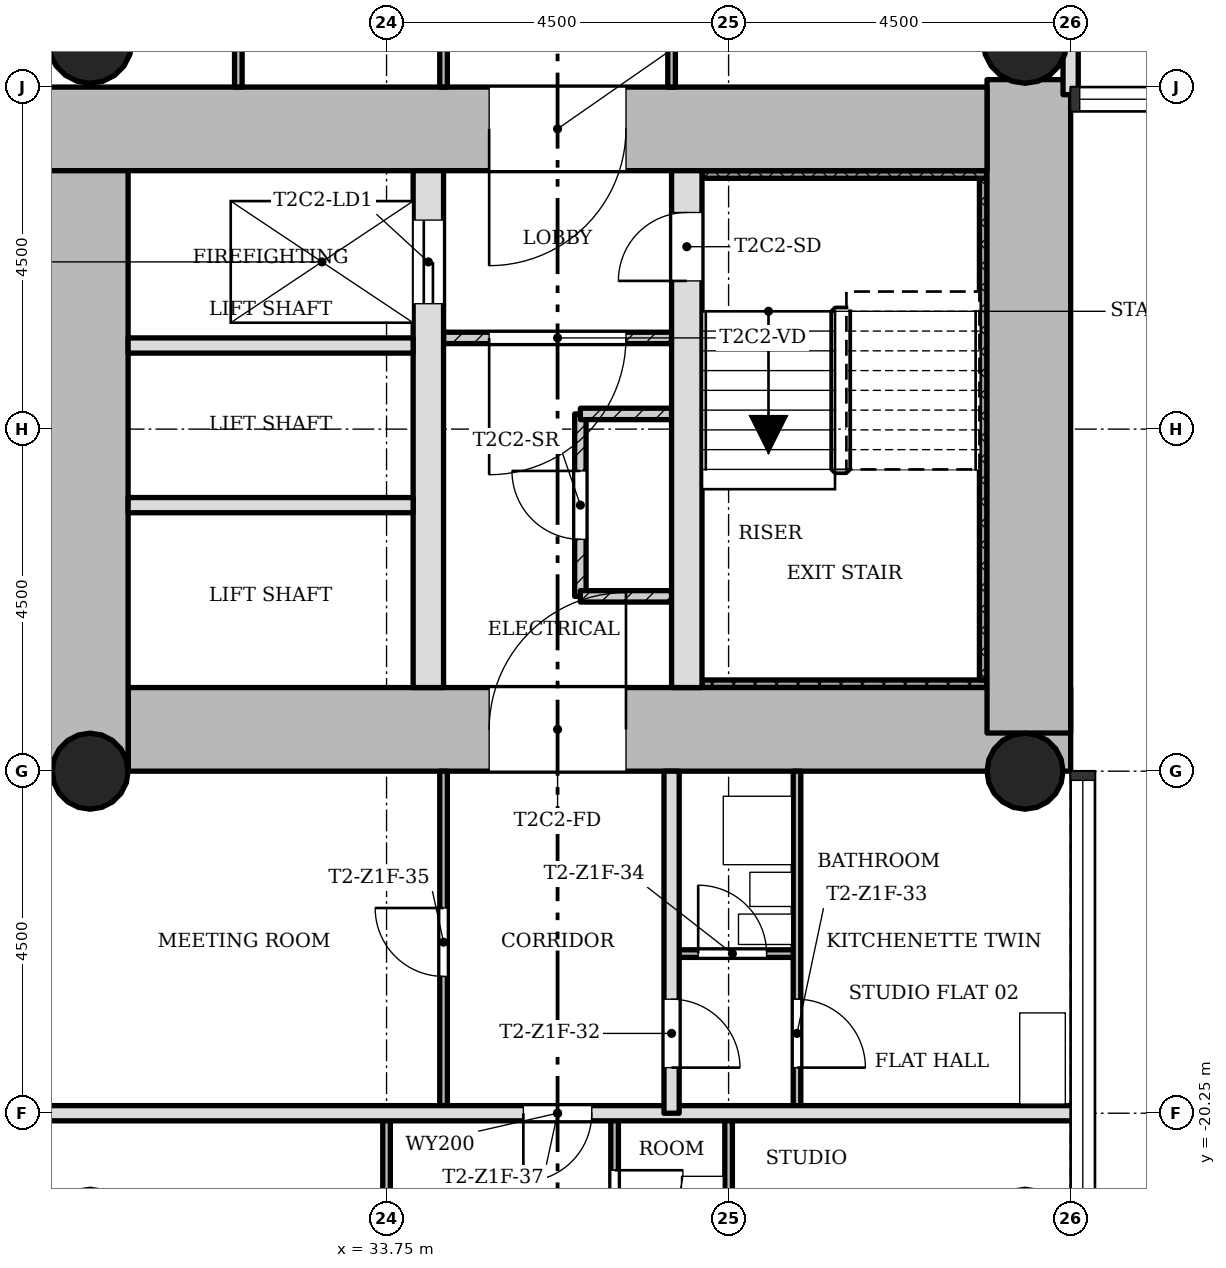
"""IFC4 building model, lengths in metres.
Left out: names, types, materials, properties, quantities, classifications, styles, units other than length and angle.
Written with IfcOpenShell. Run it as: python <this file> out.ifc"""

import sys

from ifc_helpers import new_model, si_unit, direction, frame, frame_2d, origin, origin_2d, place, context, subcontext, project, spatial, rectangle, hollow_circle, extrude, element, fill, save


model = new_model("IFC4")
c1 = context("Model", 3, precision=1e-05, world=origin(), true_north=direction((0.0, 1.0)))
c2 = subcontext(c1, "Body", "Model", "MODEL_VIEW")
j1 = project(units=[si_unit("LENGTHUNIT", "METRE"), si_unit("PLANEANGLEUNIT", "RADIAN")], contexts=[c1])
p1 = place(None, origin())
s1 = spatial("IfcSite", under=j1, at=p1, CompositionType="ELEMENT")
p2 = place(p1, origin())
s2 = spatial("IfcBuilding", under=s1, at=p2, CompositionType="ELEMENT")
p3 = place(p2, frame((0.0, 0.0, 68.7)))
s3 = spatial("IfcBuildingStorey", under=s2, at=p3, CompositionType="ELEMENT", Elevation=68.7)
p4 = place(p3, frame((30.35, -15.2, 0.0), z_axis=(0.0, 0.0, 1.0), x_axis=(1.0, 0.0, 0.0)))
e1 = element("IfcWall", 1, at=p4, inside=s3, PredefinedType="SHEAR", context=c2, shape_type="SweptSolid", body=[
    extrude(rectangle(XDim=12.4, YDim=1.1, at=frame_2d((6.2, 0.0))), origin(), (0.0, 0.0, 1.0), 3.4),
])
p5 = place(p4, frame((4.75, 0.0, 0.0)))
e2 = element("IfcOpeningElement", 2, at=p5, cuts=e1, PredefinedType="OPENING", context=c2, shape_type="SweptSolid", body=[
    extrude(rectangle(XDim=1.8, YDim=2.1, at=frame_2d((0.9, 1.05))), frame((0.0, 0.56, 0.0), z_axis=(0.0, -1.0, 0.0), x_axis=(1.0, 0.0, 0.0)), (0.0, 0.0, 1.0), 1.12),
])
p6 = place(p3, frame((42.2, -15.248, 0.0), z_axis=(0.0, 0.0, 1.0), x_axis=(0.0, 1.0, 0.0)))
e3 = element("IfcWall", 3, at=p6, inside=s3, PredefinedType="SHEAR", context=c2, shape_type="SweptSolid", body=[
    extrude(rectangle(XDim=8.596, YDim=1.1, at=frame_2d((4.298, 0.0))), origin(), (0.0, 0.0, 1.0), 3.4),
])
p7 = place(p3, frame((41.65, -7.3, 0.0), z_axis=(0.0, 0.0, 1.0), x_axis=(-1.0, 0.0, 0.0)))
e4 = element("IfcWall", 4, at=p7, inside=s3, PredefinedType="SHEAR", context=c2, shape_type="SweptSolid", body=[
    extrude(rectangle(XDim=12.4, YDim=1.1, at=frame_2d((6.2, 0.0))), origin(), (0.0, 0.0, 1.0), 3.4),
])
p8 = place(p7, frame((4.75, 0.0, 0.0)))
e5 = element("IfcOpeningElement", 5, at=p8, cuts=e4, PredefinedType="OPENING", context=c2, shape_type="SweptSolid", body=[
    extrude(rectangle(XDim=1.8, YDim=2.1, at=frame_2d((0.9, 1.05))), frame((0.0, 0.56, 0.0), z_axis=(0.0, -1.0, 0.0), x_axis=(1.0, 0.0, 0.0)), (0.0, 0.0, 1.0), 1.12),
])
p9 = place(p3, frame((29.8, -7.85, 0.0), z_axis=(0.0, 0.0, 1.0), x_axis=(0.0, -1.0, 0.0)))
e6 = element("IfcWall", 6, at=p9, inside=s3, PredefinedType="SHEAR", context=c2, shape_type="SweptSolid", body=[
    extrude(rectangle(XDim=7.9, YDim=1.1, at=frame_2d((3.95, 0.0))), origin(), (0.0, 0.0, 1.0), 3.4),
])
p10 = place(p3, frame((34.3, -14.65, 0.0), z_axis=(0.0, 0.0, 1.0), x_axis=(0.0, 1.0, 0.0)))
e7 = element("IfcWall", 7, at=p10, inside=s3, PredefinedType="SHEAR", context=c2, shape_type="SweptSolid", body=[
    extrude(rectangle(XDim=6.8, YDim=0.4, at=frame_2d((3.4, 0.0))), origin(), (0.0, 0.0, 1.0), 3.4),
])
p11 = place(p10, frame((5.05, 0.0, 0.0)))
e8 = element("IfcOpeningElement", 8, at=p11, cuts=e7, PredefinedType="OPENING", context=c2, shape_type="SweptSolid", body=[
    extrude(rectangle(XDim=1.1, YDim=2.1, at=frame_2d((0.55, 1.05))), frame((0.0, 0.21, 0.0), z_axis=(0.0, -1.0, 0.0), x_axis=(1.0, 0.0, 0.0)), (0.0, 0.0, 1.0), 0.42),
])
p12 = place(p3, frame((37.7, -14.65, 0.0), z_axis=(0.0, 0.0, 1.0), x_axis=(0.0, 1.0, 0.0)))
e9 = element("IfcWall", 9, at=p12, inside=s3, PredefinedType="SHEAR", context=c2, shape_type="SweptSolid", body=[
    extrude(rectangle(XDim=6.8, YDim=0.4, at=frame_2d((3.4, 0.0))), origin(), (0.0, 0.0, 1.0), 3.4),
])
p13 = place(p12, frame((5.35, 0.0, 0.0)))
e10 = element("IfcOpeningElement", 10, at=p13, cuts=e9, PredefinedType="OPENING", context=c2, shape_type="SweptSolid", body=[
    extrude(rectangle(XDim=0.9, YDim=2.1, at=frame_2d((0.45, 1.05))), frame((0.0, 0.21, 0.0), z_axis=(0.0, -1.0, 0.0), x_axis=(1.0, 0.0, 0.0)), (0.0, 0.0, 1.0), 0.42),
])
for number, where, z_axis, x_axis in (
    (11, (42.15, -15.75, 0.0), (0.0, 0.0, 1.0), (1.0, 0.0, 0.0)),
    (12, (29.85, -15.75, 0.0), (0.0, 0.0, 1.0), (1.0, 0.0, 0.0)),
):
    element("IfcColumn", number, at=place(p3, frame(where, z_axis=z_axis, x_axis=x_axis)), inside=s3, PredefinedType="COLUMN", context=c2, shape_type="SweptSolid", body=[
        extrude(hollow_circle(Radius=0.5, WallThickness=0.036, at=origin_2d()), origin(), (0.0, 0.0, 1.0), 3.4),
    ])
for number, where, z_axis, x_axis in (
    (13, (42.15, -6.15, 0.0), (0.0, 0.0, 1.0), (1.0, 0.0, 0.0)),
    (14, (29.85, -6.15, 0.0), (0.0, 0.0, 1.0), (1.0, 0.0, 0.0)),
):
    element("IfcColumn", number, at=place(p3, frame(where, z_axis=z_axis, x_axis=x_axis)), inside=s3, PredefinedType="COLUMN", context=c2, shape_type="SweptSolid", body=[
        extrude(hollow_circle(Radius=0.55, WallThickness=0.04, at=origin_2d()), origin(), (0.0, 0.0, 1.0), 3.4),
    ])
p14 = place(p3, frame((34.5, -10.05, 0.0), z_axis=(0.0, 0.0, 1.0), x_axis=(1.0, 0.0, 0.0)))
e15 = element("IfcWall", 15, at=p14, inside=s3, PredefinedType="PARTITIONING", context=c2, shape_type="SweptSolid", body=[
    extrude(rectangle(XDim=3.0, YDim=0.15, at=frame_2d((1.5, 0.0))), origin(), (0.0, 0.0, 1.0), 3.0),
])
p15 = place(p14, frame((0.6, 0.0, 0.0)))
e16 = element("IfcOpeningElement", 16, at=p15, cuts=e15, PredefinedType="OPENING", context=c2, shape_type="SweptSolid", body=[
    extrude(rectangle(XDim=1.8, YDim=2.1, at=frame_2d((0.9, 1.05))), frame((0.0, 0.085, 0.0), z_axis=(0.0, -1.0, 0.0), x_axis=(1.0, 0.0, 0.0)), (0.0, 0.0, 1.0), 0.17),
])
for number, where, z_axis, x_axis in (
    (17, (30.35, -10.15, 0.0), (0.0, 0.0, 1.0), (1.0, 0.0, 0.0)),
    (18, (30.35, -12.25, 0.0), (0.0, 0.0, 1.0), (1.0, 0.0, 0.0)),
):
    element("IfcWall", number, at=place(p3, frame(where, z_axis=z_axis, x_axis=x_axis)), inside=s3, PredefinedType="SOLIDWALL", context=c2, shape_type="SweptSolid", body=[
        extrude(rectangle(XDim=3.75, YDim=0.2, at=frame_2d((1.875, 0.0))), origin(), (0.0, 0.0, 1.0), 3.0),
    ])
p16 = place(p3, frame((36.3, -11.05, 0.0), z_axis=(0.0, 0.0, 1.0), x_axis=(0.0, -1.0, 0.0)))
e19 = element("IfcWall", 19, at=p16, inside=s3, PredefinedType="PARTITIONING", context=c2, shape_type="SweptSolid", body=[
    extrude(rectangle(XDim=2.4, YDim=0.15, at=frame_2d((1.2, 0.0))), origin(), (0.0, 0.0, 1.0), 3.0),
])
p17 = place(p16, frame((0.75, 0.0, 0.0)))
e20 = element("IfcOpeningElement", 20, at=p17, cuts=e19, PredefinedType="OPENING", context=c2, shape_type="SweptSolid", body=[
    extrude(rectangle(XDim=0.9, YDim=2.1, at=frame_2d((0.45, 1.05))), frame((0.0, 0.085, 0.0), z_axis=(0.0, -1.0, 0.0), x_axis=(1.0, 0.0, 0.0)), (0.0, 0.0, 1.0), 0.17),
])
for number, where, z_axis, x_axis in (
    (21, (36.3, -11.05, 0.0), (0.0, 0.0, 1.0), (1.0, 0.0, 0.0)),
    (22, (36.3, -13.45, 0.0), (0.0, 0.0, 1.0), (1.0, 0.0, 0.0)),
):
    element("IfcWall", number, at=place(p3, frame(where, z_axis=z_axis, x_axis=x_axis)), inside=s3, PredefinedType="PARTITIONING", context=c2, shape_type="SweptSolid", body=[
        extrude(rectangle(XDim=1.2, YDim=0.15, at=frame_2d((0.6, 0.0))), origin(), (0.0, 0.0, 1.0), 3.0),
    ])
p18 = place(p3, frame((42.85, -20.25, 0.0), z_axis=(0.0, 0.0, 1.0), x_axis=(-1.0, 0.0, 0.0)))
e23 = element("IfcWall", 23, at=p18, inside=s3, PredefinedType="SOLIDWALL", context=c2, shape_type="SweptSolid", body=[
    extrude(rectangle(XDim=13.7, YDim=0.2, at=frame_2d((6.85, 0.0))), origin(), (0.0, 0.0, 1.0), 3.0),
])
p19 = place(p18, frame((6.4, 0.0, 0.0)))
e24 = element("IfcOpeningElement", 24, at=p19, cuts=e23, PredefinedType="OPENING", context=c2, shape_type="SweptSolid", body=[
    extrude(rectangle(XDim=0.9, YDim=2.1, at=frame_2d((0.45, 1.05))), frame((0.0, 0.11, 0.0), z_axis=(0.0, -1.0, 0.0), x_axis=(1.0, 0.0, 0.0)), (0.0, 0.0, 1.0), 0.22),
])
p20 = place(p3, frame((39.15, -18.15, 0.0), z_axis=(0.0, 0.0, 1.0), x_axis=(-1.0, 0.0, 0.0)))
e25 = element("IfcWall", 25, at=p20, inside=s3, PredefinedType="PARTITIONING", context=c2, shape_type="SweptSolid", body=[
    extrude(rectangle(XDim=1.65, YDim=0.1, at=frame_2d((0.825, 0.0))), origin(), (0.0, 0.0, 1.0), 3.0),
])
p21 = place(p20, frame((0.4, 0.0, 0.0)))
e26 = element("IfcOpeningElement", 26, at=p21, cuts=e25, PredefinedType="OPENING", context=c2, shape_type="SweptSolid", body=[
    extrude(rectangle(XDim=0.9, YDim=2.1, at=frame_2d((0.45, 1.05))), frame((0.0, 0.06, 0.0), z_axis=(0.0, -1.0, 0.0), x_axis=(1.0, 0.0, 0.0)), (0.0, 0.0, 1.0), 0.12),
])
p22 = place(p3, frame((42.75, -6.85, 0.0), z_axis=(0.0, 0.0, 1.0), x_axis=(0.0, 1.0, 0.0)))
e27 = element("IfcWall", 27, at=p22, inside=s3, PredefinedType="SOLIDWALL", context=c2, shape_type="SweptSolid", body=[
    extrude(rectangle(XDim=13.7, YDim=0.2, at=frame_2d((6.85, 0.0))), origin(), (0.0, 0.0, 1.0), 3.0),
])
p23 = place(p22, frame((6.4, 0.0, 0.0)))
e28 = element("IfcOpeningElement", 28, at=p23, cuts=e27, PredefinedType="OPENING", context=c2, shape_type="SweptSolid", body=[
    extrude(rectangle(XDim=0.9, YDim=2.1, at=frame_2d((0.45, 1.05))), frame((0.0, 0.11, 0.0), z_axis=(0.0, -1.0, 0.0), x_axis=(1.0, 0.0, 0.0)), (0.0, 0.0, 1.0), 0.22),
])
p24 = place(p3, frame((39.15, -20.25, 0.0), z_axis=(0.0, 0.0, 1.0), x_axis=(0.0, 1.0, 0.0)))
e29 = element("IfcWall", 29, at=p24, inside=s3, PredefinedType="PARTITIONING", context=c2, shape_type="SweptSolid", body=[
    extrude(rectangle(XDim=4.5, YDim=0.1, at=frame_2d((2.25, 0.0))), origin(), (0.0, 0.0, 1.0), 3.0),
])
p25 = place(p24, frame((0.6, 0.0, 0.0)))
e30 = element("IfcOpeningElement", 30, at=p25, cuts=e29, PredefinedType="OPENING", context=c2, shape_type="SweptSolid", body=[
    extrude(rectangle(XDim=0.9, YDim=2.1, at=frame_2d((0.45, 1.05))), frame((0.0, 0.06, 0.0), z_axis=(0.0, -1.0, 0.0), x_axis=(1.0, 0.0, 0.0)), (0.0, 0.0, 1.0), 0.12),
])
p26 = place(p3, frame((38.25, -24.85, 0.0), z_axis=(0.0, 0.0, 1.0), x_axis=(0.0, 1.0, 0.0)))
e31 = element("IfcWall", 31, at=p26, inside=s3, PredefinedType="PARTITIONING", context=c2, shape_type="SweptSolid", body=[
    extrude(rectangle(XDim=4.6, YDim=0.1, at=frame_2d((2.3, 0.0))), origin(), (0.0, 0.0, 1.0), 3.0),
])
p27 = place(p26, frame((1.25, 0.0, 0.0)))
e32 = element("IfcOpeningElement", 32, at=p27, cuts=e31, PredefinedType="OPENING", context=c2, shape_type="SweptSolid", body=[
    extrude(rectangle(XDim=0.9, YDim=2.1, at=frame_2d((0.45, 1.05))), frame((0.0, 0.06, 0.0), z_axis=(0.0, -1.0, 0.0), x_axis=(1.0, 0.0, 0.0)), (0.0, 0.0, 1.0), 0.12),
])
p28 = place(p3, frame((37.5, -6.75, 0.0), z_axis=(0.0, 0.0, 1.0), x_axis=(0.0, 1.0, 0.0)))
e33 = element("IfcWall", 33, at=p28, inside=s3, PredefinedType="PARTITIONING", context=c2, shape_type="SweptSolid", body=[
    extrude(rectangle(XDim=5.85, YDim=0.1, at=frame_2d((2.925, 0.0))), origin(), (0.0, 0.0, 1.0), 3.0),
])
p29 = place(p28, frame((1.575, 0.0, 0.0)))
e34 = element("IfcOpeningElement", 34, at=p29, cuts=e33, PredefinedType="OPENING", context=c2, shape_type="SweptSolid", body=[
    extrude(rectangle(XDim=0.9, YDim=2.1, at=frame_2d((0.45, 1.05))), frame((0.0, 0.06, 0.0), z_axis=(0.0, -1.0, 0.0), x_axis=(1.0, 0.0, 0.0)), (0.0, 0.0, 1.0), 0.12),
])
p30 = place(p3, frame((37.5, -20.25, 0.0), z_axis=(0.0, 0.0, 1.0), x_axis=(0.0, 1.0, 0.0)))
e35 = element("IfcWall", 35, at=p30, inside=s3, PredefinedType="SOLIDWALL", context=c2, shape_type="SweptSolid", body=[
    extrude(rectangle(XDim=4.5, YDim=0.2, at=frame_2d((2.25, 0.0))), origin(), (0.0, 0.0, 1.0), 3.0),
])
p31 = place(p30, frame((0.6, 0.0, 0.0)))
e36 = element("IfcOpeningElement", 36, at=p31, cuts=e35, PredefinedType="OPENING", context=c2, shape_type="SweptSolid", body=[
    extrude(rectangle(XDim=0.9, YDim=2.1, at=frame_2d((0.45, 1.05))), frame((0.0, 0.11, 0.0), z_axis=(0.0, -1.0, 0.0), x_axis=(1.0, 0.0, 0.0)), (0.0, 0.0, 1.0), 0.22),
])
p32 = place(p3, frame((36.75, -22.65, 0.0), z_axis=(0.0, 0.0, 1.0), x_axis=(0.0, 1.0, 0.0)))
e37 = element("IfcWall", 37, at=p32, inside=s3, PredefinedType="PARTITIONING", context=c2, shape_type="SweptSolid", body=[
    extrude(rectangle(XDim=2.4, YDim=0.1, at=frame_2d((1.2, 0.0))), origin(), (0.0, 0.0, 1.0), 3.0),
])
p33 = place(p32, frame((0.75, 0.0, 0.0)))
e38 = element("IfcOpeningElement", 38, at=p33, cuts=e37, PredefinedType="OPENING", context=c2, shape_type="SweptSolid", body=[
    extrude(rectangle(XDim=0.9, YDim=2.1, at=frame_2d((0.45, 1.05))), frame((0.0, 0.06, 0.0), z_axis=(0.0, -1.0, 0.0), x_axis=(1.0, 0.0, 0.0)), (0.0, 0.0, 1.0), 0.12),
])
p34 = place(p3, frame((34.5, -20.25, 0.0), z_axis=(0.0, 0.0, 1.0), x_axis=(0.0, 1.0, 0.0)))
e39 = element("IfcWall", 39, at=p34, inside=s3, PredefinedType="PARTITIONING", context=c2, shape_type="SweptSolid", body=[
    extrude(rectangle(XDim=4.5, YDim=0.1, at=frame_2d((2.25, 0.0))), origin(), (0.0, 0.0, 1.0), 3.0),
])
p35 = place(p34, frame((1.8, 0.0, 0.0)))
e40 = element("IfcOpeningElement", 40, at=p35, cuts=e39, PredefinedType="OPENING", context=c2, shape_type="SweptSolid", body=[
    extrude(rectangle(XDim=0.9, YDim=2.1, at=frame_2d((0.45, 1.05))), frame((0.0, 0.06, 0.0), z_axis=(0.0, -1.0, 0.0), x_axis=(1.0, 0.0, 0.0)), (0.0, 0.0, 1.0), 0.12),
])
p36 = place(p3, frame((34.5, -6.75, 0.0), z_axis=(0.0, 0.0, 1.0), x_axis=(0.0, 1.0, 0.0)))
e41 = element("IfcWall", 41, at=p36, inside=s3, PredefinedType="PARTITIONING", context=c2, shape_type="SweptSolid", body=[
    extrude(rectangle(XDim=5.85, YDim=0.1, at=frame_2d((2.925, 0.0))), origin(), (0.0, 0.0, 1.0), 3.0),
])
p37 = place(p36, frame((2.475, 0.0, 0.0)))
e42 = element("IfcOpeningElement", 42, at=p37, cuts=e41, PredefinedType="OPENING", context=c2, shape_type="SweptSolid", body=[
    extrude(rectangle(XDim=0.9, YDim=2.1, at=frame_2d((0.45, 1.05))), frame((0.0, 0.06, 0.0), z_axis=(0.0, -1.0, 0.0), x_axis=(1.0, 0.0, 0.0)), (0.0, 0.0, 1.0), 0.12),
])
p38 = place(p3, frame((33.75, -24.85, 0.0), z_axis=(0.0, 0.0, 1.0), x_axis=(0.0, 1.0, 0.0)))
e43 = element("IfcWall", 43, at=p38, inside=s3, PredefinedType="PARTITIONING", context=c2, shape_type="SweptSolid", body=[
    extrude(rectangle(XDim=4.6, YDim=0.1, at=frame_2d((2.3, 0.0))), origin(), (0.0, 0.0, 1.0), 3.0),
])
p39 = place(p38, frame((1.9, 0.0, 0.0)))
e44 = element("IfcOpeningElement", 44, at=p39, cuts=e43, PredefinedType="OPENING", context=c2, shape_type="SweptSolid", body=[
    extrude(rectangle(XDim=0.9, YDim=2.1, at=frame_2d((0.45, 1.05))), frame((0.0, 0.06, 0.0), z_axis=(0.0, -1.0, 0.0), x_axis=(1.0, 0.0, 0.0)), (0.0, 0.0, 1.0), 0.12),
])
p40 = place(p3, frame((31.8, -6.75, 0.0), z_axis=(0.0, 0.0, 1.0), x_axis=(0.0, 1.0, 0.0)))
e45 = element("IfcWall", 45, at=p40, inside=s3, PredefinedType="PARTITIONING", context=c2, shape_type="SweptSolid", body=[
    extrude(rectangle(XDim=5.85, YDim=0.1, at=frame_2d((2.925, 0.0))), origin(), (0.0, 0.0, 1.0), 3.0),
])
p41 = place(p3, frame((37.9, -14.6, 0.0), z_axis=(0.0, 0.0, 1.0), x_axis=(1.0, 0.0, 0.0)))
e46 = element("IfcWall", 46, at=p41, inside=s3, PredefinedType="SHEAR", context=c2, shape_type="SweptSolid", body=[
    extrude(rectangle(XDim=3.75, YDim=0.1, at=frame_2d((1.875, 0.0))), origin(), (0.0, 0.0, 1.0), 3.4),
])
p42 = place(p3, frame((41.6, -7.95, 0.0), z_axis=(0.0, 0.0, 1.0), x_axis=(0.0, -1.0, 0.0)))
e47 = element("IfcWall", 47, at=p42, inside=s3, PredefinedType="SHEAR", context=c2, shape_type="SweptSolid", body=[
    extrude(rectangle(XDim=6.6, YDim=0.1, at=frame_2d((3.3, 0.0))), origin(), (0.0, 0.0, 1.0), 3.4),
])
p43 = place(p3, frame((37.9, -7.9, 0.0), z_axis=(0.0, 0.0, 1.0), x_axis=(1.0, 0.0, 0.0)))
e48 = element("IfcWall", 48, at=p43, inside=s3, PredefinedType="SHEAR", context=c2, shape_type="SweptSolid", body=[
    extrude(rectangle(XDim=3.75, YDim=0.1, at=frame_2d((1.875, 0.0))), origin(), (0.0, 0.0, 1.0), 3.4),
])
p44 = place(p15, origin())
e49 = element("IfcDoor", 49, at=p44, inside=s3, OperationType="SINGLE_SWING_LEFT", PredefinedType="DOOR", context=c2, shape_type="SweptSolid", body=[
    extrude(rectangle(XDim=1.8, YDim=2.1, at=frame_2d((0.9, 1.05))), frame((0.0, 0.025, 0.0), z_axis=(0.0, -1.0, 0.0), x_axis=(1.0, 0.0, 0.0)), (0.0, 0.0, 1.0), 0.05),
])
fill(e16, e49)
p45 = place(p17, origin())
e50 = element("IfcDoor", 50, at=p45, inside=s3, OperationType="SINGLE_SWING_LEFT", PredefinedType="DOOR", context=c2, shape_type="SweptSolid", body=[
    extrude(rectangle(XDim=0.9, YDim=2.1, at=frame_2d((0.45, 1.05))), frame((0.0, 0.025, 0.0), z_axis=(0.0, -1.0, 0.0), x_axis=(1.0, 0.0, 0.0)), (0.0, 0.0, 1.0), 0.05),
])
fill(e20, e50)
p46 = place(p31, origin())
e51 = element("IfcDoor", 51, at=p46, inside=s3, OperationType="SINGLE_SWING_LEFT", PredefinedType="DOOR", context=c2, shape_type="SweptSolid", body=[
    extrude(rectangle(XDim=0.9, YDim=2.1, at=frame_2d((0.45, 1.05))), frame((0.0, 0.025, 0.0), z_axis=(0.0, -1.0, 0.0), x_axis=(1.0, 0.0, 0.0)), (0.0, 0.0, 1.0), 0.05),
])
fill(e36, e51)
p47 = place(p25, origin())
e52 = element("IfcDoor", 52, at=p47, inside=s3, OperationType="SINGLE_SWING_LEFT", PredefinedType="DOOR", context=c2, shape_type="SweptSolid", body=[
    extrude(rectangle(XDim=0.9, YDim=2.1, at=frame_2d((0.45, 1.05))), frame((0.0, 0.025, 0.0), z_axis=(0.0, -1.0, 0.0), x_axis=(1.0, 0.0, 0.0)), (0.0, 0.0, 1.0), 0.05),
])
fill(e30, e52)
p48 = place(p21, origin())
e53 = element("IfcDoor", 53, at=p48, inside=s3, OperationType="SINGLE_SWING_RIGHT", PredefinedType="DOOR", context=c2, shape_type="SweptSolid", body=[
    extrude(rectangle(XDim=0.9, YDim=2.1, at=frame_2d((0.45, 1.05))), frame((0.0, 0.025, 0.0), z_axis=(0.0, -1.0, 0.0), x_axis=(1.0, 0.0, 0.0)), (0.0, 0.0, 1.0), 0.05),
])
fill(e26, e53)
p49 = place(p35, origin())
e54 = element("IfcDoor", 54, at=p49, inside=s3, OperationType="SINGLE_SWING_LEFT", PredefinedType="DOOR", context=c2, shape_type="SweptSolid", body=[
    extrude(rectangle(XDim=0.9, YDim=2.1, at=frame_2d((0.45, 1.05))), frame((0.0, 0.025, 0.0), z_axis=(0.0, -1.0, 0.0), x_axis=(1.0, 0.0, 0.0)), (0.0, 0.0, 1.0), 0.05),
])
fill(e40, e54)
p50 = place(p33, origin())
e55 = element("IfcDoor", 55, at=p50, inside=s3, OperationType="SINGLE_SWING_RIGHT", PredefinedType="DOOR", context=c2, shape_type="SweptSolid", body=[
    extrude(rectangle(XDim=0.9, YDim=2.1, at=frame_2d((0.45, 1.05))), frame((0.0, 0.025, 0.0), z_axis=(0.0, -1.0, 0.0), x_axis=(1.0, 0.0, 0.0)), (0.0, 0.0, 1.0), 0.05),
])
fill(e38, e55)
p51 = place(p19, origin())
e56 = element("IfcDoor", 56, at=p51, inside=s3, OperationType="SINGLE_SWING_LEFT", PredefinedType="DOOR", context=c2, shape_type="SweptSolid", body=[
    extrude(rectangle(XDim=0.9, YDim=2.1, at=frame_2d((0.45, 1.05))), frame((0.0, 0.025, 0.0), z_axis=(0.0, -1.0, 0.0), x_axis=(1.0, 0.0, 0.0)), (0.0, 0.0, 1.0), 0.05),
])
fill(e24, e56)
p52 = place(p13, origin())
e57 = element("IfcDoor", 57, at=p52, inside=s3, OperationType="SINGLE_SWING_RIGHT", PredefinedType="DOOR", context=c2, shape_type="SweptSolid", body=[
    extrude(rectangle(XDim=0.9, YDim=2.1, at=frame_2d((0.45, 1.05))), frame((0.0, 0.025, 0.0), z_axis=(0.0, -1.0, 0.0), x_axis=(1.0, 0.0, 0.0)), (0.0, 0.0, 1.0), 0.05),
])
fill(e10, e57)
p53 = place(p11, origin())
e58 = element("IfcDoor", 58, at=p53, inside=s3, OperationType="SLIDING_TO_LEFT", PredefinedType="DOOR", context=c2, shape_type="SweptSolid", body=[
    extrude(rectangle(XDim=1.1, YDim=2.1, at=frame_2d((0.55, 1.05))), frame((0.0, 0.025, 0.0), z_axis=(0.0, -1.0, 0.0), x_axis=(1.0, 0.0, 0.0)), (0.0, 0.0, 1.0), 0.05),
])
fill(e8, e58)
p54 = place(p8, origin())
e59 = element("IfcDoor", 59, at=p54, inside=s3, OperationType="SINGLE_SWING_LEFT", PredefinedType="DOOR", context=c2, shape_type="SweptSolid", body=[
    extrude(rectangle(XDim=1.8, YDim=2.1, at=frame_2d((0.9, 1.05))), frame((0.0, 0.025, 0.0), z_axis=(0.0, -1.0, 0.0), x_axis=(1.0, 0.0, 0.0)), (0.0, 0.0, 1.0), 0.05),
])
fill(e5, e59)
p55 = place(p5, origin())
e60 = element("IfcDoor", 60, at=p55, inside=s3, OperationType="SINGLE_SWING_LEFT", PredefinedType="DOOR", context=c2, shape_type="SweptSolid", body=[
    extrude(rectangle(XDim=1.8, YDim=2.1, at=frame_2d((0.9, 1.05))), frame((0.0, 0.025, 0.0), z_axis=(0.0, -1.0, 0.0), x_axis=(1.0, 0.0, 0.0)), (0.0, 0.0, 1.0), 0.05),
])
fill(e2, e60)
save(model, sys.argv[1])
